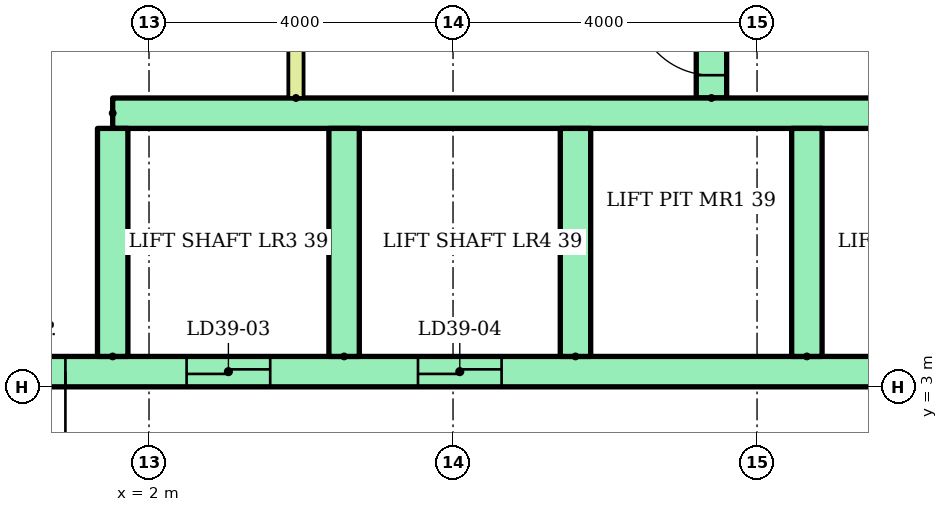
"""IFC4 building model, lengths in metres.
Left out: names, types, materials, properties, quantities, classifications, styles, units other than length and angle.
Written with IfcOpenShell. Run it as: python <this file> out.ifc"""

import sys

from ifc_helpers import new_model, si_unit, direction, frame, frame_2d, origin, place, context, subcontext, project, spatial, rectangle, extrude, element, fill, save


model = new_model("IFC4")
c1 = context("Model", 3, precision=1e-05, world=origin(), true_north=direction((0.0, 1.0)))
c2 = subcontext(c1, "Body", "Model", "MODEL_VIEW")
j1 = project(units=[si_unit("LENGTHUNIT", "METRE"), si_unit("PLANEANGLEUNIT", "RADIAN")], contexts=[c1])
p1 = place(None, origin())
s1 = spatial("IfcSite", under=j1, at=p1, CompositionType="ELEMENT")
p2 = place(p1, origin())
s2 = spatial("IfcBuilding", under=s1, at=p2, CompositionType="ELEMENT")
p3 = place(p2, frame((0.0, 0.0, 148.6)))
s3 = spatial("IfcBuildingStorey", under=s2, at=p3, CompositionType="ELEMENT", Elevation=148.6)
p4 = place(p3, frame((9.4, 6.8, 0.0), z_axis=(0.0, 0.0, 1.0), x_axis=(0.0, 1.0, 0.0)))
e1 = element("IfcWall", 1, at=p4, inside=s3, PredefinedType="SHEAR", context=c2, shape_type="SweptSolid", body=[
    extrude(rectangle(XDim=12.7, YDim=0.4, at=frame_2d((6.35, 0.0))), origin(), (0.0, 0.0, 1.0), 2.8),
])
p5 = place(p4, frame((0.3, 0.0, 0.0)))
e2 = element("IfcOpeningElement", 2, at=p5, cuts=e1, PredefinedType="OPENING", context=c2, shape_type="SweptSolid", body=[
    extrude(rectangle(XDim=1.0, YDim=2.1, at=frame_2d((0.5, 1.05))), frame((0.0, 0.21, 0.0), z_axis=(0.0, -1.0, 0.0), x_axis=(1.0, 0.0, 0.0)), (0.0, 0.0, 1.0), 0.42),
])
p6 = place(p4, frame((2.05, 0.0, 0.0)))
e3 = element("IfcOpeningElement", 3, at=p6, cuts=e1, PredefinedType="OPENING", context=c2, shape_type="SweptSolid", body=[
    extrude(rectangle(XDim=1.0, YDim=2.1, at=frame_2d((0.5, 1.05))), frame((0.0, 0.21, 0.0), z_axis=(0.0, -1.0, 0.0), x_axis=(1.0, 0.0, 0.0)), (0.0, 0.0, 1.0), 0.42),
])
p7 = place(p4, frame((7.925, 0.0, 0.0)))
e4 = element("IfcOpeningElement", 4, at=p7, cuts=e1, PredefinedType="OPENING", context=c2, shape_type="SweptSolid", body=[
    extrude(rectangle(XDim=1.0, YDim=2.1, at=frame_2d((0.5, 1.05))), frame((0.0, 0.21, 0.0), z_axis=(0.0, -1.0, 0.0), x_axis=(1.0, 0.0, 0.0)), (0.0, 0.0, 1.0), 0.42),
])
p8 = place(p3, frame((-13.5, 3.2, 0.0)))
e5 = element("IfcWall", 5, at=p8, inside=s3, PredefinedType="SHEAR", context=c2, shape_type="SweptSolid", body=[
    extrude(rectangle(XDim=27.0, YDim=0.4, at=frame_2d((13.5, 0.0))), origin(), (0.0, 0.0, 1.0), 2.8),
])
p9 = place(p8, frame((6.861, 0.0, 0.0)))
e6 = element("IfcOpeningElement", 6, at=p9, cuts=e5, PredefinedType="OPENING", context=c2, shape_type="SweptSolid", body=[
    extrude(rectangle(XDim=1.1, YDim=2.1, at=frame_2d((0.55, 1.05))), frame((0.0, 0.21, 0.0), z_axis=(0.0, -1.0, 0.0), x_axis=(1.0, 0.0, 0.0)), (0.0, 0.0, 1.0), 0.42),
])
p10 = place(p8, frame((9.906, 0.0, 0.0)))
e7 = element("IfcOpeningElement", 7, at=p10, cuts=e5, PredefinedType="OPENING", context=c2, shape_type="SweptSolid", body=[
    extrude(rectangle(XDim=1.1, YDim=2.1, at=frame_2d((0.55, 1.05))), frame((0.0, 0.21, 0.0), z_axis=(0.0, -1.0, 0.0), x_axis=(1.0, 0.0, 0.0)), (0.0, 0.0, 1.0), 0.42),
])
p11 = place(p8, frame((15.994, 0.0, 0.0)))
e8 = element("IfcOpeningElement", 8, at=p11, cuts=e5, PredefinedType="OPENING", context=c2, shape_type="SweptSolid", body=[
    extrude(rectangle(XDim=1.1, YDim=2.1, at=frame_2d((0.55, 1.05))), frame((0.0, 0.21, 0.0), z_axis=(0.0, -1.0, 0.0), x_axis=(1.0, 0.0, 0.0)), (0.0, 0.0, 1.0), 0.42),
])
p12 = place(p8, frame((19.039, 0.0, 0.0)))
e9 = element("IfcOpeningElement", 9, at=p12, cuts=e5, PredefinedType="OPENING", context=c2, shape_type="SweptSolid", body=[
    extrude(rectangle(XDim=1.1, YDim=2.1, at=frame_2d((0.55, 1.05))), frame((0.0, 0.21, 0.0), z_axis=(0.0, -1.0, 0.0), x_axis=(1.0, 0.0, 0.0)), (0.0, 0.0, 1.0), 0.42),
])
p13 = place(p8, frame((12.6, 0.0, 0.0)))
e10 = element("IfcOpeningElement", 10, at=p13, cuts=e5, PredefinedType="OPENING", context=c2, shape_type="SweptSolid", body=[
    extrude(rectangle(XDim=1.8, YDim=2.1, at=frame_2d((0.9, 1.05))), frame((0.0, 0.21, 0.0), z_axis=(0.0, -1.0, 0.0), x_axis=(1.0, 0.0, 0.0)), (0.0, 0.0, 1.0), 0.42),
])
p14 = place(p3, frame((1.522, 6.6, 0.0)))
e11 = element("IfcWall", 11, at=p14, inside=s3, PredefinedType="SHEAR", context=c2, shape_type="SweptSolid", body=[
    extrude(rectangle(XDim=11.978, YDim=0.4, at=frame_2d((5.989, 0.0))), origin(), (0.0, 0.0, 1.0), 2.8),
])
for number, where, z_axis, x_axis in (
    (12, (1.522, 3.4, 0.0), (0.0, 0.0, 1.0), (0.0, 1.0, 0.0)),
    (13, (4.567, 3.4, 0.0), (0.0, 0.0, 1.0), (0.0, 1.0, 0.0)),
    (14, (7.611, 3.4, 0.0), (0.0, 0.0, 1.0), (0.0, 1.0, 0.0)),
    (15, (10.656, 3.4, 0.0), (0.0, 0.0, 1.0), (0.0, 1.0, 0.0)),
):
    element("IfcWall", number, at=place(p3, frame(where, z_axis=z_axis, x_axis=x_axis)), inside=s3, PredefinedType="SHEAR", context=c2, shape_type="SweptSolid", body=[
        extrude(rectangle(XDim=3.0, YDim=0.4, at=frame_2d((1.5, 0.0))), origin(), (0.0, 0.0, 1.0), 2.8),
    ])
p15 = place(p3, frame((3.933, 6.8, 0.0), z_axis=(0.0, 0.0, 1.0), x_axis=(0.0, 1.0, 0.0)))
e16 = element("IfcWall", 16, at=p15, inside=s3, PredefinedType="PARTITIONING", context=c2, shape_type="SweptSolid", body=[
    extrude(rectangle(XDim=3.3, YDim=0.2, at=frame_2d((1.65, 0.0))), origin(), (0.0, 0.0, 1.0), 2.8),
])
p16 = place(p15, frame((1.1, 0.0, 0.0)))
e17 = element("IfcOpeningElement", 17, at=p16, cuts=e16, PredefinedType="OPENING", context=c2, shape_type="SweptSolid", body=[
    extrude(rectangle(XDim=1.1, YDim=2.1, at=frame_2d((0.55, 1.05))), frame((0.0, 0.11, 0.0), z_axis=(0.0, -1.0, 0.0), x_axis=(1.0, 0.0, 0.0)), (0.0, 0.0, 1.0), 0.22),
])
p17 = place(p11, origin())
e18 = element("IfcDoor", 18, at=p17, inside=s3, OperationType="SLIDING_TO_LEFT", PredefinedType="DOOR", context=c2, shape_type="SweptSolid", body=[
    extrude(rectangle(XDim=1.1, YDim=2.1, at=frame_2d((0.55, 1.05))), frame((0.0, 0.025, 0.0), z_axis=(0.0, -1.0, 0.0), x_axis=(1.0, 0.0, 0.0)), (0.0, 0.0, 1.0), 0.05),
])
fill(e8, e18)
p18 = place(p12, origin())
e19 = element("IfcDoor", 19, at=p18, inside=s3, OperationType="SLIDING_TO_LEFT", PredefinedType="DOOR", context=c2, shape_type="SweptSolid", body=[
    extrude(rectangle(XDim=1.1, YDim=2.1, at=frame_2d((0.55, 1.05))), frame((0.0, 0.025, 0.0), z_axis=(0.0, -1.0, 0.0), x_axis=(1.0, 0.0, 0.0)), (0.0, 0.0, 1.0), 0.05),
])
fill(e9, e19)
p19 = place(p13, frame((1.8, 0.0, 0.0), z_axis=(0.0, 0.0, 1.0), x_axis=(-1.0, 0.0, 0.0)))
e20 = element("IfcDoor", 20, at=p19, inside=s3, OperationType="DOUBLE_DOOR_SINGLE_SWING", PredefinedType="DOOR", context=c2, shape_type="SweptSolid", body=[
    extrude(rectangle(XDim=1.8, YDim=2.1, at=frame_2d((0.9, 1.05))), frame((0.0, 0.025, 0.0), z_axis=(0.0, -1.0, 0.0), x_axis=(1.0, 0.0, 0.0)), (0.0, 0.0, 1.0), 0.05),
])
fill(e10, e20)
p20 = place(p5, origin())
e21 = element("IfcDoor", 21, at=p20, inside=s3, OperationType="SINGLE_SWING_RIGHT", PredefinedType="DOOR", context=c2, shape_type="SweptSolid", body=[
    extrude(rectangle(XDim=1.0, YDim=2.1, at=frame_2d((0.5, 1.05))), frame((0.0, 0.025, 0.0), z_axis=(0.0, -1.0, 0.0), x_axis=(1.0, 0.0, 0.0)), (0.0, 0.0, 1.0), 0.05),
])
fill(e2, e21)
save(model, sys.argv[1])
